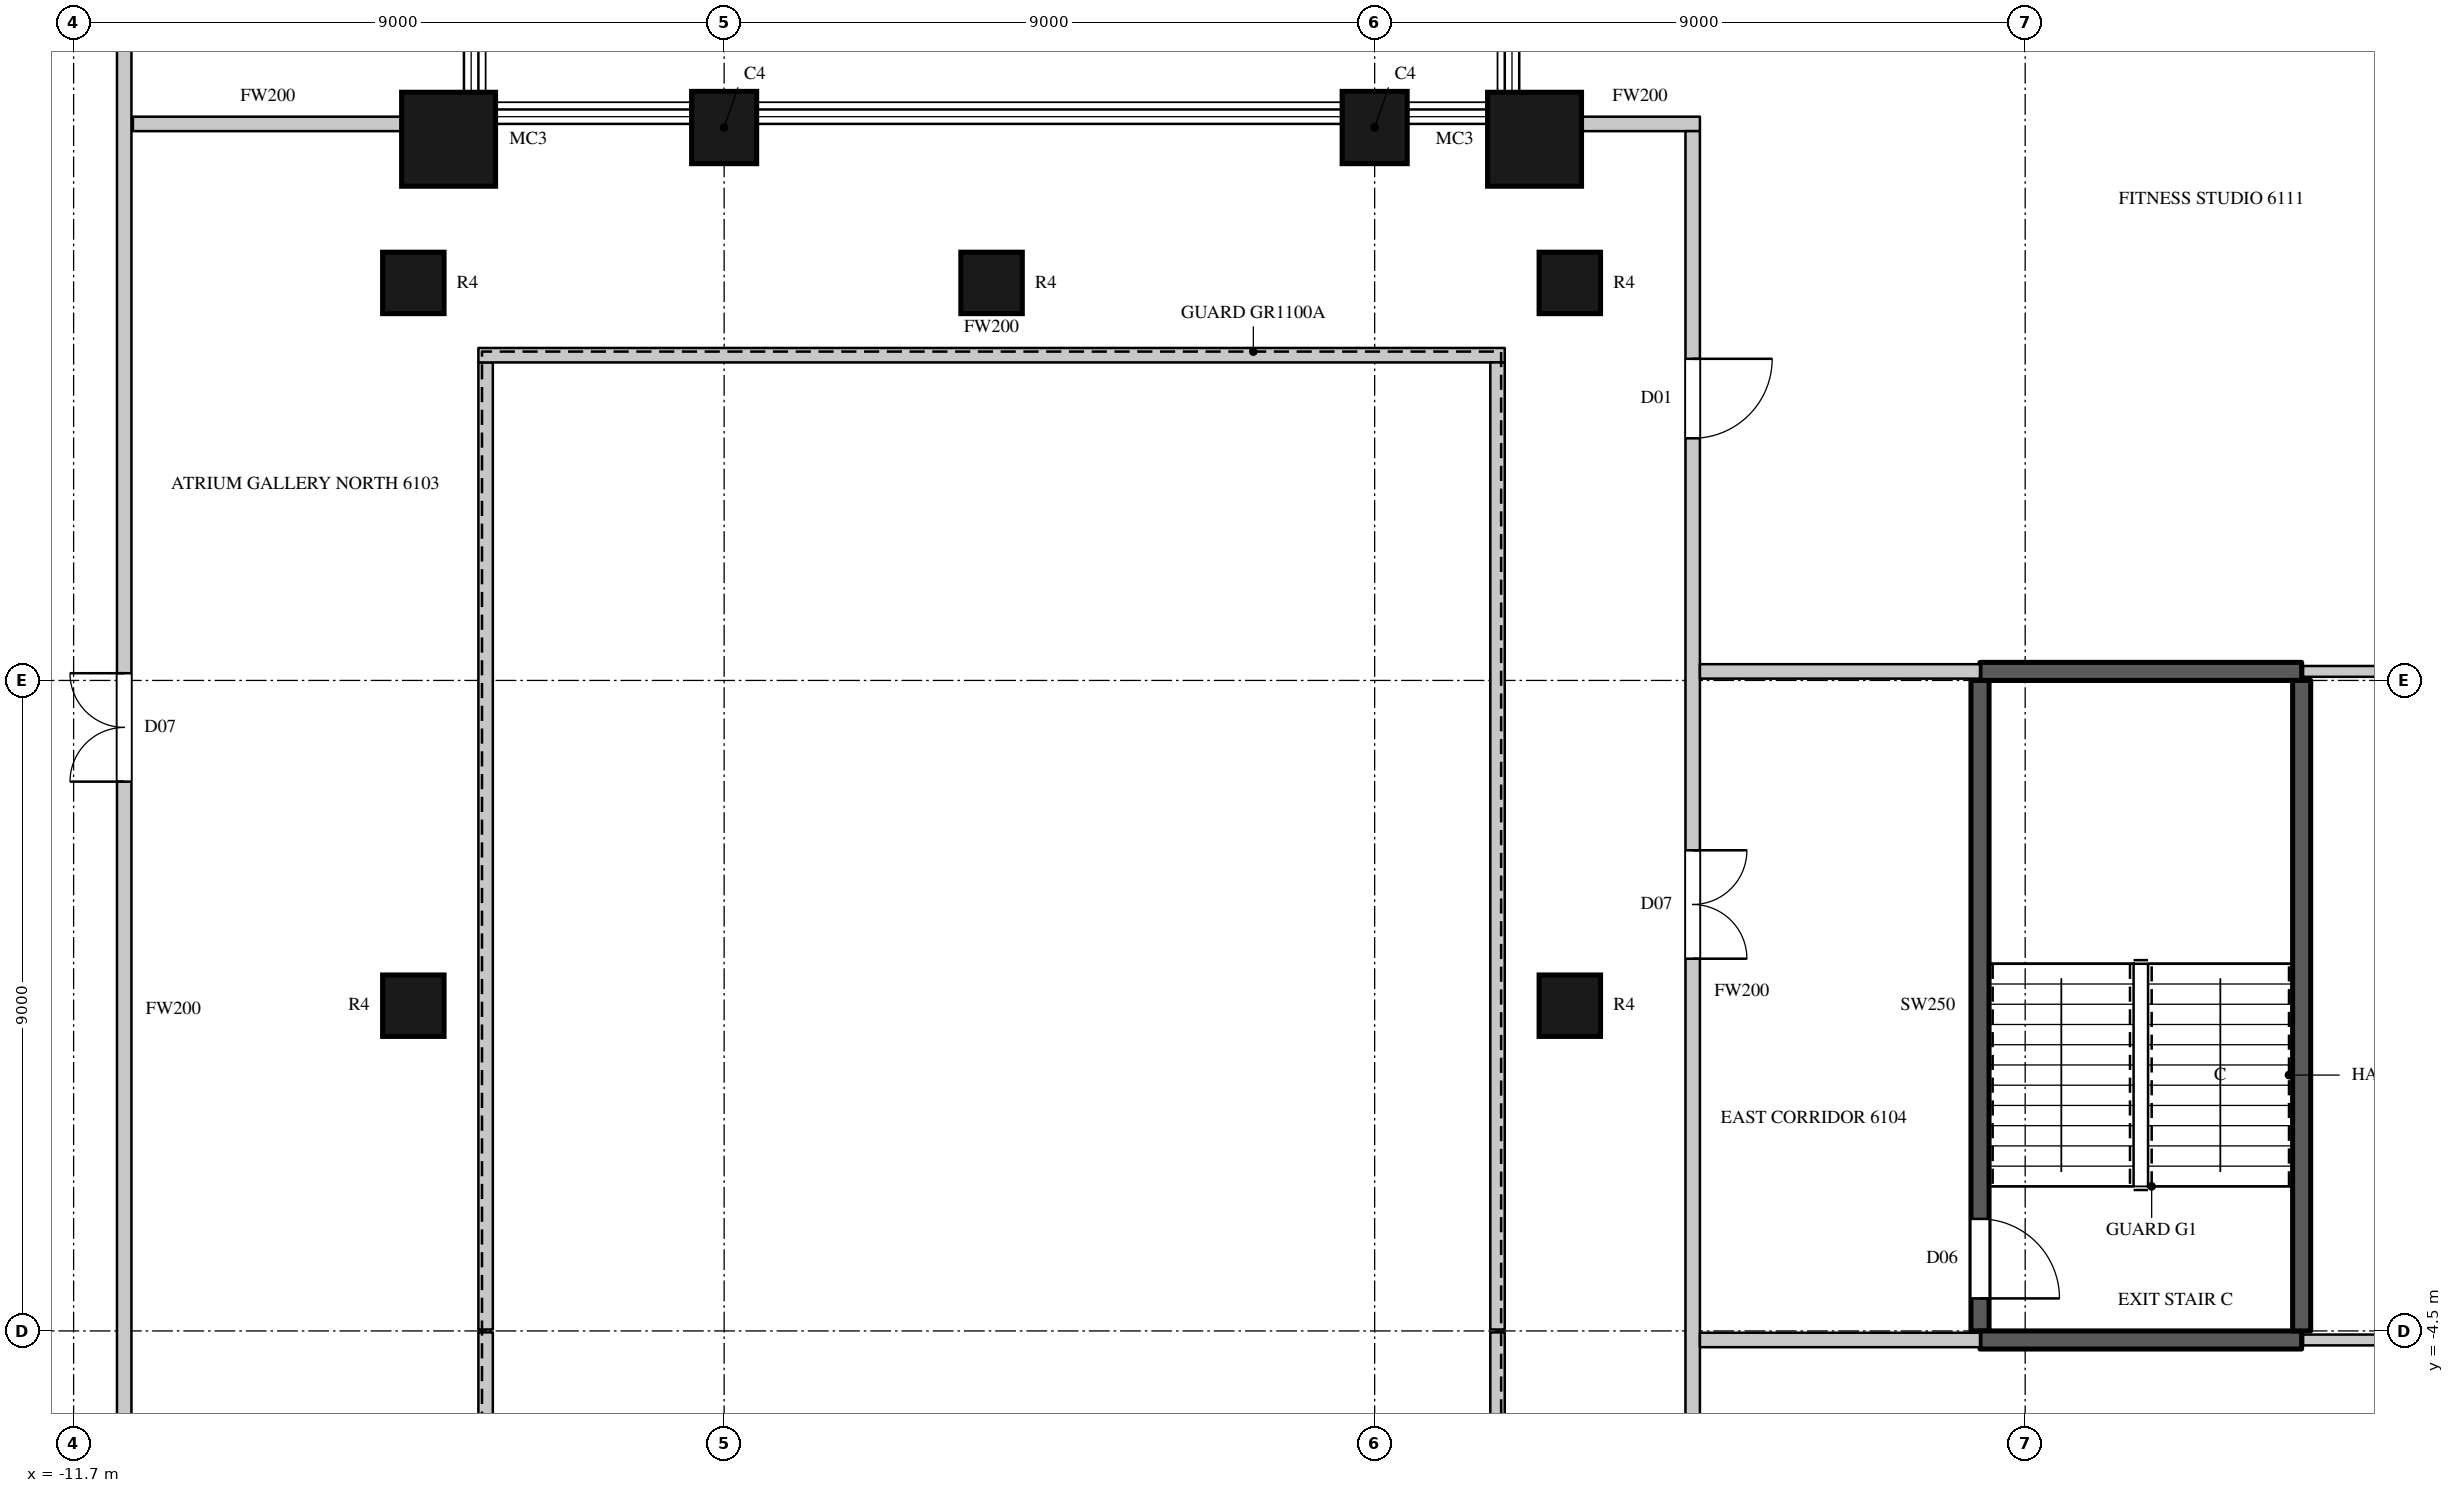
"""IFC4 building model, lengths in metres.
Left out: names, types, materials, properties, quantities, classifications, styles, units other than length and angle.
Written with IfcOpenShell. Run it as: python <this file> out.ifc"""

import sys

from ifc_helpers import new_model, si_unit, direction, frame, frame_2d, origin, origin_2d, place, context, subcontext, project, spatial, rectangle, circle, extrude, element, fill, save


model = new_model("IFC4")
c1 = context("Model", 3, precision=1e-05, world=origin(), true_north=direction((0.0, 1.0)))
c2 = subcontext(c1, "Body", "Model", "MODEL_VIEW")
j1 = project(units=[si_unit("LENGTHUNIT", "METRE"), si_unit("PLANEANGLEUNIT", "RADIAN")], contexts=[c1])
p1 = place(None, origin())
s1 = spatial("IfcSite", under=j1, at=p1, CompositionType="ELEMENT")
p2 = place(p1, origin())
s2 = spatial("IfcBuilding", under=s1, at=p2, CompositionType="ELEMENT")
p3 = place(p2, frame((0.0, 0.0, 272.1)))
s3 = spatial("IfcBuildingStorey", under=s2, at=p3, CompositionType="ELEMENT", Elevation=272.1)
p4 = place(p3, frame((8.512, 11.988, 0.0), z_axis=(0.0, 0.0, 1.0), x_axis=(1.0, 0.0, 0.0)))
e1 = element("IfcColumn", 1, at=p4, inside=s3, PredefinedType="COLUMN", context=c2, shape_type="SweptSolid", body=[
    extrude(circle(Radius=0.65, at=origin_2d()), origin(), (0.0, 0.0, 1.0), 4.1),
])
for number, where, z_axis, x_axis in (
    (2, (6.3, 12.15, 0.0), (0.0, 0.0, 1.0), (-1.0, 0.0, 0.0)),
    (3, (-2.7, 12.15, 0.0), (0.0, 0.0, 1.0), (-1.0, 0.0, 0.0)),
):
    element("IfcColumn", number, at=place(p3, frame(where, z_axis=z_axis, x_axis=x_axis)), inside=s3, PredefinedType="COLUMN", context=c2, shape_type="SweptSolid", body=[
        extrude(rectangle(XDim=0.9, YDim=1.0, at=origin_2d()), origin(), (0.0, 0.0, 1.0), 4.1),
    ])
p5 = place(p3, frame((-6.512, 11.988, 0.0), z_axis=(0.0, 0.0, 1.0), x_axis=(1.0, 0.0, 0.0)))
e4 = element("IfcColumn", 4, at=p5, inside=s3, PredefinedType="COLUMN", context=c2, shape_type="SweptSolid", body=[
    extrude(circle(Radius=0.65, at=origin_2d()), origin(), (0.0, 0.0, 1.0), 4.1),
])
for number, where, z_axis, x_axis in (
    (5, (-7.0, 0.0, 0.0), (0.0, 0.0, 1.0), (1.0, 0.0, 0.0)),
    (6, (-7.0, 10.0, 0.0), (0.0, 0.0, 1.0), (1.0, 0.0, 0.0)),
    (7, (1.0, 10.0, 0.0), (0.0, 0.0, 1.0), (1.0, 0.0, 0.0)),
    (8, (9.0, 0.0, 0.0), (0.0, 0.0, 1.0), (1.0, 0.0, 0.0)),
    (9, (9.0, 10.0, 0.0), (0.0, 0.0, 1.0), (1.0, 0.0, 0.0)),
):
    element("IfcColumn", number, at=place(p3, frame(where, z_axis=z_axis, x_axis=x_axis)), inside=s3, PredefinedType="COLUMN", context=c2, shape_type="SweptSolid", body=[
        extrude(circle(Radius=0.425, at=origin_2d()), origin(), (0.0, 0.0, 1.0), 4.1),
    ])
p6 = place(p3, frame((-11.0, -14.8, 0.0), z_axis=(0.0, 0.0, 1.0), x_axis=(0.0, 1.0, 0.0)))
e10 = element("IfcWall", 10, at=p6, inside=s3, PredefinedType="PARTITIONING", context=c2, shape_type="SweptSolid", body=[
    extrude(rectangle(XDim=29.5, YDim=0.2, at=frame_2d((14.75, 0.0))), origin(), (0.0, 0.0, 1.0), 3.8),
])
p7 = place(p6, frame((17.9, 0.0, 0.0)))
e11 = element("IfcOpeningElement", 11, at=p7, cuts=e10, PredefinedType="OPENING", context=c2, shape_type="SweptSolid", body=[
    extrude(rectangle(XDim=1.5, YDim=2.4, at=frame_2d((0.75, 1.2))), frame((0.0, 0.11, 0.0), z_axis=(0.0, -1.0, 0.0), x_axis=(1.0, 0.0, 0.0)), (0.0, 0.0, 1.0), 0.22),
])
p8 = place(p3, frame((-10.88, 12.2, 0.0), z_axis=(0.0, 0.0, 1.0), x_axis=(1.0, 0.0, 0.0)))
e12 = element("IfcWall", 12, at=p8, inside=s3, PredefinedType="PARTITIONING", context=c2, shape_type="SweptSolid", body=[
    extrude(rectangle(XDim=3.736, YDim=0.2, at=frame_2d((1.868, 0.0))), origin(), (0.0, 0.0, 1.0), 3.8),
])
p9 = place(p3, frame((-6.0, -8.9, 0.0), z_axis=(0.0, 0.0, 1.0), x_axis=(0.0, 1.0, 0.0)))
e13 = element("IfcWall", 13, at=p9, inside=s3, PredefinedType="PARTITIONING", context=c2, shape_type="SweptSolid", body=[
    extrude(rectangle(XDim=4.38, YDim=0.2, at=frame_2d((2.19, 0.0))), origin(), (0.0, 0.0, 1.0), 3.8),
])
p10 = place(p3, frame((-6.0, -4.48, 0.0), z_axis=(0.0, 0.0, 1.0), x_axis=(0.0, 1.0, 0.0)))
e14 = element("IfcWall", 14, at=p10, inside=s3, PredefinedType="PARTITIONING", context=c2, shape_type="SweptSolid", body=[
    extrude(rectangle(XDim=13.38, YDim=0.2, at=frame_2d((6.69, 0.0))), origin(), (0.0, 0.0, 1.0), 3.8),
])
p11 = place(p3, frame((-6.1, 9.0, 0.0), z_axis=(0.0, 0.0, 1.0), x_axis=(1.0, 0.0, 0.0)))
e15 = element("IfcWall", 15, at=p11, inside=s3, PredefinedType="PARTITIONING", context=c2, shape_type="SweptSolid", body=[
    extrude(rectangle(XDim=14.2, YDim=0.2, at=frame_2d((7.1, 0.0))), origin(), (0.0, 0.0, 1.0), 3.8),
])
p12 = place(p3, frame((8.0, -8.9, 0.0), z_axis=(0.0, 0.0, 1.0), x_axis=(0.0, 1.0, 0.0)))
e16 = element("IfcWall", 16, at=p12, inside=s3, PredefinedType="PARTITIONING", context=c2, shape_type="SweptSolid", body=[
    extrude(rectangle(XDim=4.38, YDim=0.2, at=frame_2d((2.19, 0.0))), origin(), (0.0, 0.0, 1.0), 3.8),
])
p13 = place(p3, frame((8.0, -4.48, 0.0), z_axis=(0.0, 0.0, 1.0), x_axis=(0.0, 1.0, 0.0)))
e17 = element("IfcWall", 17, at=p13, inside=s3, PredefinedType="PARTITIONING", context=c2, shape_type="SweptSolid", body=[
    extrude(rectangle(XDim=13.38, YDim=0.2, at=frame_2d((6.69, 0.0))), origin(), (0.0, 0.0, 1.0), 3.8),
])
p14 = place(p3, frame((9.144, 12.2, 0.0), z_axis=(0.0, 0.0, 1.0), x_axis=(1.0, 0.0, 0.0)))
e18 = element("IfcWall", 18, at=p14, inside=s3, PredefinedType="PARTITIONING", context=c2, shape_type="SweptSolid", body=[
    extrude(rectangle(XDim=1.656, YDim=0.2, at=frame_2d((0.828, 0.0))), origin(), (0.0, 0.0, 1.0), 3.8),
])
p15 = place(p3, frame((10.7, -11.7, 0.0), z_axis=(0.0, 0.0, 1.0), x_axis=(0.0, 1.0, 0.0)))
e19 = element("IfcWall", 19, at=p15, inside=s3, PredefinedType="PARTITIONING", context=c2, shape_type="SweptSolid", body=[
    extrude(rectangle(XDim=23.8, YDim=0.2, at=frame_2d((11.9, 0.0))), origin(), (0.0, 0.0, 1.0), 3.8),
])
p16 = place(p15, frame((12.35, 0.0, 0.0)))
e20 = element("IfcOpeningElement", 20, at=p16, cuts=e19, PredefinedType="OPENING", context=c2, shape_type="SweptSolid", body=[
    extrude(rectangle(XDim=1.5, YDim=2.4, at=frame_2d((0.75, 1.2))), frame((0.0, 0.11, 0.0), z_axis=(0.0, -1.0, 0.0), x_axis=(1.0, 0.0, 0.0)), (0.0, 0.0, 1.0), 0.22),
])
p17 = place(p15, frame((19.55, 0.0, 0.0)))
e21 = element("IfcOpeningElement", 21, at=p17, cuts=e19, PredefinedType="OPENING", context=c2, shape_type="SweptSolid", body=[
    extrude(rectangle(XDim=1.1, YDim=2.4, at=frame_2d((0.55, 1.2))), frame((0.0, 0.11, 0.0), z_axis=(0.0, -1.0, 0.0), x_axis=(1.0, 0.0, 0.0)), (0.0, 0.0, 1.0), 0.22),
])
p18 = place(p15, frame((4.25, 0.0, 0.0)))
e22 = element("IfcOpeningElement", 22, at=p18, cuts=e19, PredefinedType="OPENING", context=c2, shape_type="SweptSolid", body=[
    extrude(rectangle(XDim=1.1, YDim=2.4, at=frame_2d((0.55, 1.2))), frame((0.0, 0.11, 0.0), z_axis=(0.0, -1.0, 0.0), x_axis=(1.0, 0.0, 0.0)), (0.0, 0.0, 1.0), 0.22),
])
for number, where, z_axis, x_axis in (
    (23, (10.8, -4.625, 0.0), (0.0, 0.0, 1.0), (1.0, 0.0, 0.0)),
    (24, (10.8, 4.625, 0.0), (0.0, 0.0, 1.0), (1.0, 0.0, 0.0)),
):
    element("IfcWall", number, at=place(p3, frame(where, z_axis=z_axis, x_axis=x_axis)), inside=s3, PredefinedType="PARTITIONING", context=c2, shape_type="SweptSolid", body=[
        extrude(rectangle(XDim=3.875, YDim=0.2, at=frame_2d((1.938, 0.0))), origin(), (0.0, 0.0, 1.0), 3.8),
    ])
for number, where, z_axis, x_axis in (
    (25, (19.145, -4.625, 0.0), (0.0, 0.0, 1.0), (1.0, 0.0, 0.0)),
    (26, (19.145, 4.625, 0.0), (0.0, 0.0, 1.0), (1.0, 0.0, 0.0)),
):
    element("IfcWall", number, at=place(p3, frame(where, z_axis=z_axis, x_axis=x_axis)), inside=s3, PredefinedType="PARTITIONING", context=c2, shape_type="SweptSolid", body=[
        extrude(rectangle(XDim=4.605, YDim=0.15, at=frame_2d((2.302, 0.0))), origin(), (0.0, 0.0, 1.0), 3.8),
    ])
p19 = place(p3, frame((14.675, -4.5, 0.0), z_axis=(0.0, 0.0, 1.0), x_axis=(0.0, 1.0, 0.0)))
e27 = element("IfcWall", 27, at=p19, inside=s3, PredefinedType="SHEAR", context=c2, shape_type="SweptSolid", body=[
    extrude(rectangle(XDim=9.0, YDim=0.25, at=frame_2d((4.5, 0.0))), origin(), (0.0, 0.0, 1.0), 3.8),
])
p20 = place(p19, frame((0.45, 0.0, 0.0)))
e28 = element("IfcOpeningElement", 28, at=p20, cuts=e27, PredefinedType="OPENING", context=c2, shape_type="SweptSolid", body=[
    extrude(rectangle(XDim=1.1, YDim=2.2, at=frame_2d((0.55, 1.1))), frame((0.0, 0.135, 0.0), z_axis=(0.0, -1.0, 0.0), x_axis=(1.0, 0.0, 0.0)), (0.0, 0.0, 1.0), 0.27),
])
for number, where, z_axis, x_axis in (
    (29, (14.675, -4.625, 0.0), (0.0, 0.0, 1.0), (1.0, 0.0, 0.0)),
    (30, (14.675, 4.625, 0.0), (0.0, 0.0, 1.0), (1.0, 0.0, 0.0)),
):
    element("IfcWall", number, at=place(p3, frame(where, z_axis=z_axis, x_axis=x_axis)), inside=s3, PredefinedType="SHEAR", context=c2, shape_type="SweptSolid", body=[
        extrude(rectangle(XDim=4.45, YDim=0.25, at=frame_2d((2.225, 0.0))), origin(), (0.0, 0.0, 1.0), 3.8),
    ])
p21 = place(p3, frame((19.125, -4.5, 0.0), z_axis=(0.0, 0.0, 1.0), x_axis=(0.0, 1.0, 0.0)))
e31 = element("IfcWall", 31, at=p21, inside=s3, PredefinedType="SHEAR", context=c2, shape_type="SweptSolid", body=[
    extrude(rectangle(XDim=9.0, YDim=0.25, at=frame_2d((4.5, 0.0))), origin(), (0.0, 0.0, 1.0), 3.8),
])
p22 = place(p7, origin())
e32 = element("IfcDoor", 32, at=p22, inside=s3, OperationType="DOUBLE_DOOR_SINGLE_SWING", PredefinedType="DOOR", context=c2, shape_type="SweptSolid", body=[
    extrude(rectangle(XDim=1.5, YDim=2.4, at=frame_2d((0.75, 1.2))), frame((0.0, 0.025, 0.0), z_axis=(0.0, -1.0, 0.0), x_axis=(1.0, 0.0, 0.0)), (0.0, 0.0, 1.0), 0.05),
])
fill(e11, e32)
p23 = place(p16, origin())
e33 = element("IfcDoor", 33, at=p23, inside=s3, OperationType="DOUBLE_DOOR_SINGLE_SWING", PredefinedType="DOOR", context=c2, shape_type="SweptSolid", body=[
    extrude(rectangle(XDim=1.5, YDim=2.4, at=frame_2d((0.75, 1.2))), frame((0.0, 0.025, 0.0), z_axis=(0.0, -1.0, 0.0), x_axis=(1.0, 0.0, 0.0)), (0.0, 0.0, 1.0), 0.05),
])
fill(e20, e33)
p24 = place(p17, origin())
e34 = element("IfcDoor", 34, at=p24, inside=s3, OperationType="SINGLE_SWING_LEFT", PredefinedType="DOOR", context=c2, shape_type="SweptSolid", body=[
    extrude(rectangle(XDim=1.1, YDim=2.4, at=frame_2d((0.55, 1.2))), frame((0.0, 0.025, 0.0), z_axis=(0.0, -1.0, 0.0), x_axis=(1.0, 0.0, 0.0)), (0.0, 0.0, 1.0), 0.05),
])
fill(e21, e34)
p25 = place(p20, origin())
e35 = element("IfcDoor", 35, at=p25, inside=s3, OperationType="SINGLE_SWING_RIGHT", PredefinedType="DOOR", context=c2, shape_type="SweptSolid", body=[
    extrude(rectangle(XDim=1.1, YDim=2.2, at=frame_2d((0.55, 1.1))), frame((0.0, 0.025, 0.0), z_axis=(0.0, -1.0, 0.0), x_axis=(1.0, 0.0, 0.0)), (0.0, 0.0, 1.0), 0.05),
])
fill(e28, e35)
save(model, sys.argv[1])
